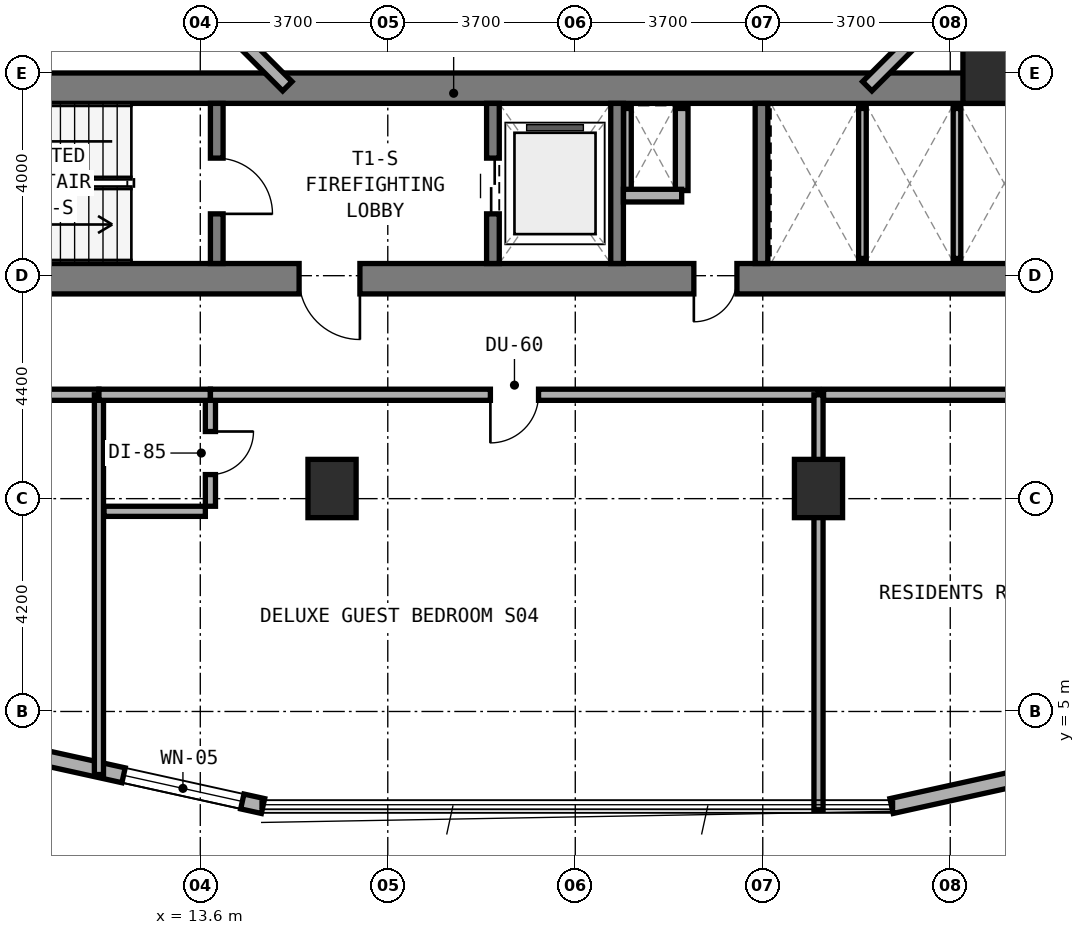
"""IFC4 building model, lengths in metres.
Left out: names, types, materials, properties, quantities, classifications, styles, units other than length and angle.
Written with IfcOpenShell. Run it as: python <this file> out.ifc"""

import sys

from ifc_helpers import new_model, si_unit, direction, frame, frame_2d, origin, origin_2d, place, context, subcontext, project, spatial, rectangle, extrude, element, fill, save


model = new_model("IFC4")
c1 = context("Model", 3, precision=1e-05, world=origin(), true_north=direction((0.0, 1.0)))
c2 = subcontext(c1, "Body", "Model", "MODEL_VIEW")
j1 = project(units=[si_unit("LENGTHUNIT", "METRE"), si_unit("PLANEANGLEUNIT", "RADIAN")], contexts=[c1])
p1 = place(None, origin())
s1 = spatial("IfcSite", under=j1, at=p1, CompositionType="ELEMENT")
p2 = place(p1, origin())
s2 = spatial("IfcBuilding", under=s1, at=p2, CompositionType="ELEMENT")
p3 = place(p2, frame((0.0, 0.0, 45.0)))
s3 = spatial("IfcBuildingStorey", under=s2, at=p3, CompositionType="ELEMENT", Elevation=45.0)
p4 = place(p3, frame((6.2, 13.54, 0.0), z_axis=(0.0, 0.0, 1.0), x_axis=(1.0, 0.0, 0.0)))
e1 = element("IfcWall", 1, at=p4, inside=s3, PredefinedType="SHEAR", context=c2, shape_type="SweptSolid", body=[
    extrude(rectangle(XDim=24.8, YDim=0.6, at=frame_2d((12.4, 0.0))), origin(), (0.0, 0.0, 1.0), 3.5),
])
p5 = place(p4, frame((9.35, 0.0, 0.0)))
e2 = element("IfcOpeningElement", 2, at=p5, cuts=e1, PredefinedType="OPENING", context=c2, shape_type="SweptSolid", body=[
    extrude(rectangle(XDim=1.2, YDim=2.15, at=frame_2d((0.6, 1.075))), frame((0.0, 0.31, 0.0), z_axis=(0.0, -1.0, 0.0), x_axis=(1.0, 0.0, 0.0)), (0.0, 0.0, 1.0), 0.62),
])
p6 = place(p4, frame((17.14, 0.0, 0.0)))
e3 = element("IfcOpeningElement", 3, at=p6, cuts=e1, PredefinedType="OPENING", context=c2, shape_type="SweptSolid", body=[
    extrude(rectangle(XDim=0.85, YDim=2.1, at=frame_2d((0.425, 1.05))), frame((0.0, 0.31, 0.0), z_axis=(0.0, -1.0, 0.0), x_axis=(1.0, 0.0, 0.0)), (0.0, 0.0, 1.0), 0.62),
])
p7 = place(p3, frame((6.2, 17.3, 0.0), z_axis=(0.0, 0.0, 1.0), x_axis=(1.0, 0.0, 0.0)))
e4 = element("IfcWall", 4, at=p7, inside=s3, PredefinedType="SHEAR", context=c2, shape_type="SweptSolid", body=[
    extrude(rectangle(XDim=24.8, YDim=0.6, at=frame_2d((12.4, 0.0))), origin(), (0.0, 0.0, 1.0), 3.5),
])
p8 = place(p3, frame((13.925, 13.84, 0.0), z_axis=(0.0, 0.0, 1.0), x_axis=(0.0, 1.0, 0.0)))
e5 = element("IfcWall", 5, at=p8, inside=s3, PredefinedType="STANDARD", context=c2, shape_type="SweptSolid", body=[
    extrude(rectangle(XDim=3.16, YDim=0.25, at=frame_2d((1.58, 0.0))), origin(), (0.0, 0.0, 1.0), 3.22),
])
p9 = place(p8, frame((0.98, 0.0, 0.0)))
e6 = element("IfcOpeningElement", 6, at=p9, cuts=e5, PredefinedType="OPENING", context=c2, shape_type="SweptSolid", body=[
    extrude(rectangle(XDim=1.1, YDim=2.15, at=frame_2d((0.55, 1.075))), frame((0.0, 0.135, 0.0), z_axis=(0.0, -1.0, 0.0), x_axis=(1.0, 0.0, 0.0)), (0.0, 0.0, 1.0), 0.27),
])
p10 = place(p3, frame((19.375, 13.84, 0.0), z_axis=(0.0, 0.0, 1.0), x_axis=(0.0, 1.0, 0.0)))
e7 = element("IfcWall", 7, at=p10, inside=s3, PredefinedType="STANDARD", context=c2, shape_type="SweptSolid", body=[
    extrude(rectangle(XDim=3.16, YDim=0.25, at=frame_2d((1.58, 0.0))), origin(), (0.0, 0.0, 1.0), 3.22),
])
p11 = place(p10, frame((0.98, 0.0, 0.0)))
e8 = element("IfcOpeningElement", 8, at=p11, cuts=e7, PredefinedType="OPENING", context=c2, shape_type="SweptSolid", body=[
    extrude(rectangle(XDim=1.1, YDim=2.15, at=frame_2d((0.55, 1.075))), frame((0.0, 0.135, 0.0), z_axis=(0.0, -1.0, 0.0), x_axis=(1.0, 0.0, 0.0)), (0.0, 0.0, 1.0), 0.27),
])
for number, where, z_axis, x_axis in (
    (9, (21.825, 13.84, 0.0), (0.0, 0.0, 1.0), (0.0, 1.0, 0.0)),
    (10, (24.675, 13.84, 0.0), (0.0, 0.0, 1.0), (0.0, 1.0, 0.0)),
):
    element("IfcWall", number, at=place(p3, frame(where, z_axis=z_axis, x_axis=x_axis)), inside=s3, PredefinedType="STANDARD", context=c2, shape_type="SweptSolid", body=[
        extrude(rectangle(XDim=3.16, YDim=0.25, at=frame_2d((1.58, 0.0))), origin(), (0.0, 0.0, 1.0), 3.22),
    ])
for number, where, z_axis, x_axis in (
    (11, (16.2, 9.4, 0.0), (0.0, 0.0, 1.0), (1.0, 0.0, 0.0)),
    (12, (25.8, 9.4, 0.0), (0.0, 0.0, 1.0), (1.0, 0.0, 0.0)),
):
    element("IfcColumn", number, at=place(p3, frame(where, z_axis=z_axis, x_axis=x_axis)), inside=s3, PredefinedType="COLUMN", context=c2, shape_type="SweptSolid", body=[
        extrude(rectangle(XDim=0.95, YDim=1.15, at=origin_2d()), origin(), (0.0, 0.0, 1.0), 3.5),
    ])
p12 = place(p3, frame((29.2, 17.65, 0.0), z_axis=(0.0, 0.0, 1.0), x_axis=(1.0, 0.0, 0.0)))
e13 = element("IfcColumn", 13, at=p12, inside=s3, PredefinedType="COLUMN", context=c2, shape_type="SweptSolid", body=[
    extrude(rectangle(XDim=1.1, YDim=1.3, at=origin_2d()), origin(), (0.0, 0.0, 1.0), 3.5),
])
p13 = place(p3, frame((5.704, 5.148, 0.0), z_axis=(0.0, 0.0, 1.0), x_axis=(0.9765437942, -0.215318875183, 0.0)))
e14 = element("IfcWall", 14, at=p13, inside=s3, PredefinedType="STANDARD", context=c2, shape_type="SweptSolid", body=[
    extrude(rectangle(XDim=9.353, YDim=0.3, at=frame_2d((4.677, 0.0))), origin(), (0.0, 0.0, 1.0), 3.22),
])
p14 = place(p13, frame((1.754, 0.0, 0.8)))
e15 = element("IfcOpeningElement", 15, at=p14, cuts=e14, PredefinedType="OPENING", context=c2, shape_type="SweptSolid", body=[
    extrude(rectangle(XDim=2.4, YDim=1.6, at=frame_2d((1.2, 0.8))), frame((0.0, 0.16, 0.0), z_axis=(0.0, -1.0, 0.0), x_axis=(1.0, 0.0, 0.0)), (0.0, 0.0, 1.0), 0.32),
])
p15 = place(p13, frame((6.535, 0.0, 0.8)))
e16 = element("IfcOpeningElement", 16, at=p15, cuts=e14, PredefinedType="OPENING", context=c2, shape_type="SweptSolid", body=[
    extrude(rectangle(XDim=2.4, YDim=1.6, at=frame_2d((1.2, 0.8))), frame((0.0, 0.16, 0.0), z_axis=(0.0, -1.0, 0.0), x_axis=(1.0, 0.0, 0.0)), (0.0, 0.0, 1.0), 0.32),
])
p16 = place(p3, frame((27.242, 3.134, 0.0), z_axis=(0.0, 0.0, 1.0), x_axis=(0.97654500432, 0.215313386808, 0.0)))
e17 = element("IfcWall", 17, at=p16, inside=s3, PredefinedType="STANDARD", context=c2, shape_type="SweptSolid", body=[
    extrude(rectangle(XDim=9.354, YDim=0.3, at=frame_2d((4.677, 0.0))), origin(), (0.0, 0.0, 1.0), 3.22),
])
p17 = place(p16, frame((3.477, 0.0, 0.8)))
e18 = element("IfcOpeningElement", 18, at=p17, cuts=e17, PredefinedType="OPENING", context=c2, shape_type="SweptSolid", body=[
    extrude(rectangle(XDim=2.4, YDim=1.6, at=frame_2d((1.2, 0.8))), frame((0.0, 0.16, 0.0), z_axis=(0.0, -1.0, 0.0), x_axis=(1.0, 0.0, 0.0)), (0.0, 0.0, 1.0), 0.32),
])
p18 = place(p3, frame((26.762, 17.338, 0.0), z_axis=(0.0, 0.0, 1.0), x_axis=(0.707059717605, 0.707153841636, 0.0)))
e19 = element("IfcWall", 19, at=p18, inside=s3, PredefinedType="STANDARD", context=c2, shape_type="SweptSolid", body=[
    extrude(rectangle(XDim=2.594, YDim=0.26, at=frame_2d((1.297, 0.0))), origin(), (0.0, 0.0, 1.0), 3.22),
])
p19 = place(p3, frame((13.484, 19.172, 0.0), z_axis=(0.0, 0.0, 1.0), x_axis=(0.707106781187, -0.707106781187, 0.0)))
e20 = element("IfcWall", 20, at=p19, inside=s3, PredefinedType="STANDARD", context=c2, shape_type="SweptSolid", body=[
    extrude(rectangle(XDim=2.594, YDim=0.26, at=frame_2d((1.297, 0.0))), origin(), (0.0, 0.0, 1.0), 3.22),
])
p20 = place(p3, frame((22.03, 15.28, 0.0), z_axis=(0.0, 0.0, 1.0), x_axis=(0.0, 1.0, 0.0)))
e21 = element("IfcWall", 21, at=p20, inside=s3, PredefinedType="PARTITIONING", context=c2, shape_type="SweptSolid", body=[
    extrude(rectangle(XDim=1.62, YDim=0.15, at=frame_2d((0.81, 0.0))), origin(), (0.0, 0.0, 1.0), 3.22),
])
p21 = place(p3, frame((23.1, 15.28, 0.0), z_axis=(0.0, 0.0, 1.0), x_axis=(0.0, 1.0, 0.0)))
e22 = element("IfcWall", 22, at=p21, inside=s3, PredefinedType="SOLIDWALL", context=c2, shape_type="SweptSolid", body=[
    extrude(rectangle(XDim=1.62, YDim=0.25, at=frame_2d((0.81, 0.0))), origin(), (0.0, 0.0, 1.0), 3.22),
])
p22 = place(p3, frame((21.95, 15.18, 0.0), z_axis=(0.0, 0.0, 1.0), x_axis=(1.0, 0.0, 0.0)))
e23 = element("IfcWall", 23, at=p22, inside=s3, PredefinedType="SOLIDWALL", context=c2, shape_type="SweptSolid", body=[
    extrude(rectangle(XDim=1.15, YDim=0.25, at=frame_2d((0.575, 0.0))), origin(), (0.0, 0.0, 1.0), 3.22),
])
p23 = place(p3, frame((26.667, 13.94, 0.0), z_axis=(0.0, 0.0, 1.0), x_axis=(0.0, 1.0, 0.0)))
e24 = element("IfcWall", 24, at=p23, inside=s3, PredefinedType="PARTITIONING", context=c2, shape_type="SweptSolid", body=[
    extrude(rectangle(XDim=2.96, YDim=0.15, at=frame_2d((1.48, 0.0))), origin(), (0.0, 0.0, 1.0), 3.22),
])
p24 = place(p3, frame((28.533, 13.94, 0.0), z_axis=(0.0, 0.0, 1.0), x_axis=(0.0, 1.0, 0.0)))
e25 = element("IfcWall", 25, at=p24, inside=s3, PredefinedType="PARTITIONING", context=c2, shape_type="SweptSolid", body=[
    extrude(rectangle(XDim=2.96, YDim=0.15, at=frame_2d((1.48, 0.0))), origin(), (0.0, 0.0, 1.0), 2.395),
])
p25 = place(p3, frame((5.55, 11.25, 0.0), z_axis=(0.0, 0.0, 1.0), x_axis=(1.0, 0.0, 0.0)))
e26 = element("IfcWall", 26, at=p25, inside=s3, PredefinedType="SOLIDWALL", context=c2, shape_type="SweptSolid", body=[
    extrude(rectangle(XDim=6.05, YDim=0.22, at=frame_2d((3.025, 0.0))), origin(), (0.0, 0.0, 1.0), 2.395),
])
p26 = place(p25, frame((3.11, 0.0, 0.0)))
e27 = element("IfcOpeningElement", 27, at=p26, cuts=e26, PredefinedType="OPENING", context=c2, shape_type="SweptSolid", body=[
    extrude(rectangle(XDim=0.95, YDim=2.1, at=frame_2d((0.475, 1.05))), frame((0.0, 0.12, 0.0), z_axis=(0.0, -1.0, 0.0), x_axis=(1.0, 0.0, 0.0)), (0.0, 0.0, 1.0), 0.24),
])
p27 = place(p3, frame((11.6, 3.756, 0.0), z_axis=(0.0, 0.0, 1.0), x_axis=(0.0, 1.0, 0.0)))
e28 = element("IfcWall", 28, at=p27, inside=s3, PredefinedType="SOLIDWALL", context=c2, shape_type="SweptSolid", body=[
    extrude(rectangle(XDim=7.494, YDim=0.18, at=frame_2d((3.747, 0.0))), origin(), (0.0, 0.0, 1.0), 2.745),
])
p28 = place(p3, frame((13.8, 9.05, 0.0), z_axis=(0.0, 0.0, 1.0), x_axis=(0.0, 1.0, 0.0)))
e29 = element("IfcWall", 29, at=p28, inside=s3, PredefinedType="PLUMBINGWALL", context=c2, shape_type="SweptSolid", body=[
    extrude(rectangle(XDim=2.1, YDim=0.2, at=frame_2d((1.05, 0.0))), origin(), (0.0, 0.0, 1.0), 2.745),
])
p29 = place(p28, frame((0.625, 0.0, 0.0)))
e30 = element("IfcOpeningElement", 30, at=p29, cuts=e29, PredefinedType="OPENING", context=c2, shape_type="SweptSolid", body=[
    extrude(rectangle(XDim=0.85, YDim=2.1, at=frame_2d((0.425, 1.05))), frame((0.0, 0.11, 0.0), z_axis=(0.0, -1.0, 0.0), x_axis=(1.0, 0.0, 0.0)), (0.0, 0.0, 1.0), 0.22),
])
p30 = place(p3, frame((11.7, 8.95, 0.0), z_axis=(0.0, 0.0, 1.0), x_axis=(1.0, 0.0, 0.0)))
e31 = element("IfcWall", 31, at=p30, inside=s3, PredefinedType="PLUMBINGWALL", context=c2, shape_type="SweptSolid", body=[
    extrude(rectangle(XDim=2.0, YDim=0.2, at=frame_2d((1.0, 0.0))), origin(), (0.0, 0.0, 1.0), 3.22),
])
p31 = place(p3, frame((11.6, 11.25, 0.0), z_axis=(0.0, 0.0, 1.0), x_axis=(1.0, 0.0, 0.0)))
e32 = element("IfcWall", 32, at=p31, inside=s3, PredefinedType="SOLIDWALL", context=c2, shape_type="SweptSolid", body=[
    extrude(rectangle(XDim=2.2, YDim=0.22, at=frame_2d((1.1, 0.0))), origin(), (0.0, 0.0, 1.0), 2.925),
])
p32 = place(p3, frame((13.8, 11.25, 0.0), z_axis=(0.0, 0.0, 1.0), x_axis=(1.0, 0.0, 0.0)))
e33 = element("IfcWall", 33, at=p32, inside=s3, PredefinedType="SOLIDWALL", context=c2, shape_type="SweptSolid", body=[
    extrude(rectangle(XDim=12.0, YDim=0.22, at=frame_2d((6.0, 0.0))), origin(), (0.0, 0.0, 1.0), 2.395),
])
p33 = place(p32, frame((5.525, 0.0, 0.0)))
e34 = element("IfcOpeningElement", 34, at=p33, cuts=e33, PredefinedType="OPENING", context=c2, shape_type="SweptSolid", body=[
    extrude(rectangle(XDim=0.95, YDim=2.1, at=frame_2d((0.475, 1.05))), frame((0.0, 0.12, 0.0), z_axis=(0.0, -1.0, 0.0), x_axis=(1.0, 0.0, 0.0)), (0.0, 0.0, 1.0), 0.24),
])
p34 = place(p3, frame((25.8, 3.06, 0.0), z_axis=(0.0, 0.0, 1.0), x_axis=(0.0, 1.0, 0.0)))
e35 = element("IfcWall", 35, at=p34, inside=s3, PredefinedType="SOLIDWALL", context=c2, shape_type="SweptSolid", body=[
    extrude(rectangle(XDim=8.19, YDim=0.18, at=frame_2d((4.095, 0.0))), origin(), (0.0, 0.0, 1.0), 2.395),
])
p35 = place(p3, frame((25.9, 11.25, 0.0), z_axis=(0.0, 0.0, 1.0), x_axis=(1.0, 0.0, 0.0)))
e36 = element("IfcWall", 36, at=p35, inside=s3, PredefinedType="SOLIDWALL", context=c2, shape_type="SweptSolid", body=[
    extrude(rectangle(XDim=15.84, YDim=0.22, at=frame_2d((7.92, 0.0))), origin(), (0.0, 0.0, 1.0), 2.395),
])
p36 = place(p35, frame((6.411, 0.0, 0.0)))
e37 = element("IfcOpeningElement", 37, at=p36, cuts=e36, PredefinedType="OPENING", context=c2, shape_type="SweptSolid", body=[
    extrude(rectangle(XDim=0.95, YDim=2.1, at=frame_2d((0.475, 1.05))), frame((0.0, 0.12, 0.0), z_axis=(0.0, -1.0, 0.0), x_axis=(1.0, 0.0, 0.0)), (0.0, 0.0, 1.0), 0.24),
])
p37 = place(p15, origin())
e38 = element("IfcWindow", 38, at=p37, inside=s3, PartitioningType="SINGLE_PANEL", PredefinedType="WINDOW", context=c2, shape_type="SweptSolid", body=[
    extrude(rectangle(XDim=2.4, YDim=1.6, at=frame_2d((1.2, 0.8))), frame((0.0, 0.03, 0.0), z_axis=(0.0, -1.0, 0.0), x_axis=(1.0, 0.0, 0.0)), (0.0, 0.0, 1.0), 0.06),
])
fill(e16, e38)
p38 = place(p9, frame((1.1, 0.0, 0.0), z_axis=(0.0, 0.0, 1.0), x_axis=(-1.0, 0.0, 0.0)))
e39 = element("IfcDoor", 39, at=p38, inside=s3, OperationType="SINGLE_SWING_RIGHT", PredefinedType="DOOR", context=c2, shape_type="SweptSolid", body=[
    extrude(rectangle(XDim=1.1, YDim=2.15, at=frame_2d((0.55, 1.075))), frame((0.0, 0.025, 0.0), z_axis=(0.0, -1.0, 0.0), x_axis=(1.0, 0.0, 0.0)), (0.0, 0.0, 1.0), 0.05),
])
fill(e6, e39)
p39 = place(p5, frame((1.2, 0.0, 0.0), z_axis=(0.0, 0.0, 1.0), x_axis=(-1.0, 0.0, 0.0)))
e40 = element("IfcDoor", 40, at=p39, inside=s3, OperationType="SINGLE_SWING_LEFT", PredefinedType="DOOR", context=c2, shape_type="SweptSolid", body=[
    extrude(rectangle(XDim=1.2, YDim=2.15, at=frame_2d((0.6, 1.075))), frame((0.0, 0.025, 0.0), z_axis=(0.0, -1.0, 0.0), x_axis=(1.0, 0.0, 0.0)), (0.0, 0.0, 1.0), 0.05),
])
fill(e2, e40)
p40 = place(p11, origin())
e41 = element("IfcDoor", 41, at=p40, inside=s3, OperationType="DOUBLE_DOOR_SLIDING", PredefinedType="DOOR", context=c2, shape_type="SweptSolid", body=[
    extrude(rectangle(XDim=1.1, YDim=2.15, at=frame_2d((0.55, 1.075))), frame((0.0, 0.025, 0.0), z_axis=(0.0, -1.0, 0.0), x_axis=(1.0, 0.0, 0.0)), (0.0, 0.0, 1.0), 0.05),
])
fill(e8, e41)
p41 = place(p6, frame((0.85, 0.0, 0.0), z_axis=(0.0, 0.0, 1.0), x_axis=(-1.0, 0.0, 0.0)))
e42 = element("IfcDoor", 42, at=p41, inside=s3, OperationType="SINGLE_SWING_RIGHT", PredefinedType="DOOR", context=c2, shape_type="SweptSolid", body=[
    extrude(rectangle(XDim=0.85, YDim=2.1, at=frame_2d((0.425, 1.05))), frame((0.0, 0.025, 0.0), z_axis=(0.0, -1.0, 0.0), x_axis=(1.0, 0.0, 0.0)), (0.0, 0.0, 1.0), 0.05),
])
fill(e3, e42)
p42 = place(p29, frame((0.85, 0.0, 0.0), z_axis=(0.0, 0.0, 1.0), x_axis=(-1.0, 0.0, 0.0)))
e43 = element("IfcDoor", 43, at=p42, inside=s3, OperationType="SINGLE_SWING_LEFT", PredefinedType="DOOR", context=c2, shape_type="SweptSolid", body=[
    extrude(rectangle(XDim=0.85, YDim=2.1, at=frame_2d((0.425, 1.05))), frame((0.0, 0.025, 0.0), z_axis=(0.0, -1.0, 0.0), x_axis=(1.0, 0.0, 0.0)), (0.0, 0.0, 1.0), 0.05),
])
fill(e30, e43)
p43 = place(p33, frame((0.95, 0.0, 0.0), z_axis=(0.0, 0.0, 1.0), x_axis=(-1.0, 0.0, 0.0)))
e44 = element("IfcDoor", 44, at=p43, inside=s3, OperationType="SINGLE_SWING_RIGHT", PredefinedType="DOOR", context=c2, shape_type="SweptSolid", body=[
    extrude(rectangle(XDim=0.95, YDim=2.1, at=frame_2d((0.475, 1.05))), frame((0.0, 0.025, 0.0), z_axis=(0.0, -1.0, 0.0), x_axis=(1.0, 0.0, 0.0)), (0.0, 0.0, 1.0), 0.05),
])
fill(e34, e44)
save(model, sys.argv[1])
